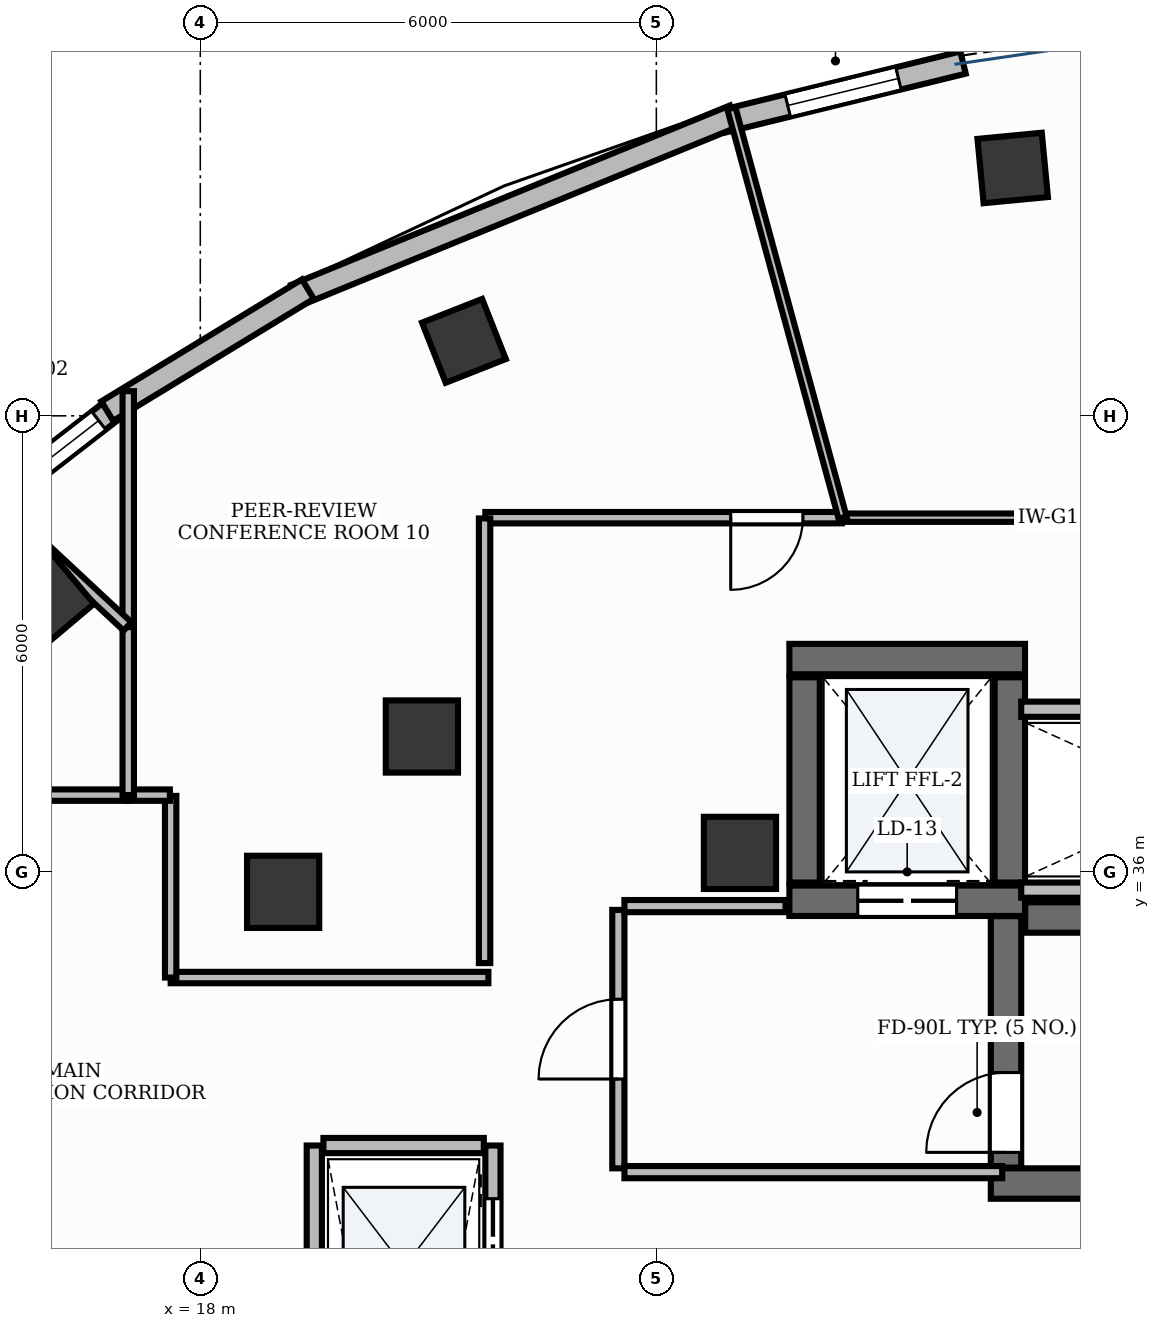
"""IFC4 building model, lengths in metres.
Left out: names, types, materials, properties, quantities, classifications, styles, units other than length and angle.
Written with IfcOpenShell. Run it as: python <this file> out.ifc"""

import sys

from ifc_helpers import new_model, si_unit, direction, frame, frame_2d, origin, origin_2d, place, context, subcontext, project, spatial, rectangle, extrude, element, fill, save


model = new_model("IFC4")
c1 = context("Model", 3, precision=1e-05, world=origin(), true_north=direction((0.0, 1.0)))
c2 = subcontext(c1, "Body", "Model", "MODEL_VIEW")
j1 = project(units=[si_unit("LENGTHUNIT", "METRE"), si_unit("PLANEANGLEUNIT", "RADIAN")], contexts=[c1])
p1 = place(None, origin())
s1 = spatial("IfcSite", under=j1, at=p1, CompositionType="ELEMENT")
p2 = place(p1, origin())
s2 = spatial("IfcBuilding", under=s1, at=p2, CompositionType="ELEMENT")
p3 = place(p2, frame((0.0, 0.0, 260.4)))
s3 = spatial("IfcBuildingStorey", under=s2, at=p3, CompositionType="ELEMENT", Elevation=260.4)
p4 = place(p3, frame((28.852, 35.4, 0.0), z_axis=(0.0, 0.0, 1.0), x_axis=(1.0, 0.0, 0.0)))
e1 = element("IfcWall", 1, at=p4, inside=s3, PredefinedType="SHEAR", context=c2, shape_type="SweptSolid", body=[
    extrude(rectangle(XDim=8.198, YDim=0.4, at=frame_2d((4.099, 0.0))), origin(), (0.0, 0.0, 1.0), 3.9),
])
p5 = place(p3, frame((28.4, 31.9, 0.0), z_axis=(0.0, 0.0, 1.0), x_axis=(1.0, 0.0, 0.0)))
e2 = element("IfcWall", 2, at=p5, inside=s3, PredefinedType="SHEAR", context=c2, shape_type="SweptSolid", body=[
    extrude(rectangle(XDim=8.65, YDim=0.4, at=frame_2d((4.325, 0.0))), origin(), (0.0, 0.0, 1.0), 3.9),
])
p6 = place(p3, frame((28.6, 32.11, 0.0), z_axis=(0.0, 0.0, 1.0), x_axis=(0.0, 1.0, 0.0)))
e3 = element("IfcWall", 3, at=p6, inside=s3, PredefinedType="SHEAR", context=c2, shape_type="SweptSolid", body=[
    extrude(rectangle(XDim=3.308, YDim=0.4, at=frame_2d((1.654, 0.0))), origin(), (0.0, 0.0, 1.0), 3.9),
])
p7 = place(p6, frame((0.2, 0.0, 0.0)))
e4 = element("IfcOpeningElement", 4, at=p7, cuts=e3, PredefinedType="OPENING", context=c2, shape_type="SweptSolid", body=[
    extrude(rectangle(XDim=1.05, YDim=2.15, at=frame_2d((0.525, 1.075))), frame((0.0, 0.215, 0.0), z_axis=(0.0, -1.0, 0.0), x_axis=(1.0, 0.0, 0.0)), (0.0, 0.0, 1.0), 0.43),
])
p8 = place(p3, frame((25.75, 38.8, 0.0), z_axis=(0.0, 0.0, 1.0), x_axis=(1.0, 0.0, 0.0)))
e5 = element("IfcWall", 5, at=p8, inside=s3, PredefinedType="SHEAR", context=c2, shape_type="SweptSolid", body=[
    extrude(rectangle(XDim=3.1, YDim=0.4, at=frame_2d((1.55, 0.0))), origin(), (0.0, 0.0, 1.0), 3.9),
])
p9 = place(p3, frame((25.75, 35.62, 0.0), z_axis=(0.0, 0.0, 1.0), x_axis=(1.0, 0.0, 0.0)))
e6 = element("IfcWall", 6, at=p9, inside=s3, PredefinedType="SHEAR", context=c2, shape_type="SweptSolid", body=[
    extrude(rectangle(XDim=3.1, YDim=0.4, at=frame_2d((1.55, 0.0))), origin(), (0.0, 0.0, 1.0), 3.9),
])
p10 = place(p9, frame((0.9, 0.0, 0.0)))
e7 = element("IfcOpeningElement", 7, at=p10, cuts=e6, PredefinedType="OPENING", context=c2, shape_type="SweptSolid", body=[
    extrude(rectangle(XDim=1.3, YDim=2.2, at=frame_2d((0.65, 1.1))), frame((0.0, 0.215, 0.0), z_axis=(0.0, -1.0, 0.0), x_axis=(1.0, 0.0, 0.0)), (0.0, 0.0, 1.0), 0.43),
])
for number, where, z_axis, x_axis in (
    (8, (25.95, 35.86, 0.0), (0.0, 0.0, 1.0), (0.0, 1.0, 0.0)),
    (9, (28.65, 35.86, 0.0), (0.0, 0.0, 1.0), (0.0, 1.0, 0.0)),
):
    element("IfcWall", number, at=place(p3, frame(where, z_axis=z_axis, x_axis=x_axis)), inside=s3, PredefinedType="SHEAR", context=c2, shape_type="SweptSolid", body=[
        extrude(rectangle(XDim=2.7, YDim=0.4, at=frame_2d((1.35, 0.0))), origin(), (0.0, 0.0, 1.0), 3.9),
    ])
p11 = place(p3, frame((25.1, 36.25, -0.0), z_axis=(0.0, 0.0, 1.0), x_axis=(1.0, 0.0, 0.0)))
e10 = element("IfcColumn", 10, at=p11, inside=s3, PredefinedType="PILASTER", context=c2, shape_type="SweptSolid", body=[
    extrude(rectangle(XDim=0.95, YDim=0.95, at=origin_2d()), origin(), (0.0, 0.0, 1.0), 3.901),
])
for number, where, z_axis, x_axis in (
    (11, (28.688, 45.261, -0.0), (0.0, 0.0, 1.0), (0.995, 0.095, 0.0)),
    (12, (21.469, 42.986, -0.0), (0.0, 0.0, 1.0), (0.93, 0.367, 0.0)),
    (13, (16.003, 39.579, -0.0), (0.0, 0.0, 1.0), (0.764, 0.645, 0.0)),
):
    element("IfcColumn", number, at=place(p3, frame(where, z_axis=z_axis, x_axis=x_axis)), inside=s3, PredefinedType="COLUMN", context=c2, shape_type="SweptSolid", body=[
        extrude(rectangle(XDim=0.85, YDim=0.85, at=origin_2d()), origin(), (0.0, 0.0, 1.0), 3.901),
    ])
for number, where, z_axis, x_axis in (
    (14, (20.915, 37.781, -0.0), (0.0, 0.0, 1.0), (1.0, 0.0, 0.0)),
    (15, (19.09, 35.738, -0.0), (0.0, 0.0, 1.0), (1.0, 0.0, 0.0)),
):
    element("IfcColumn", number, at=place(p3, frame(where, z_axis=z_axis, x_axis=x_axis)), inside=s3, PredefinedType="COLUMN", context=c2, shape_type="SweptSolid", body=[
        extrude(rectangle(XDim=0.95, YDim=0.95, at=origin_2d()), origin(), (0.0, 0.0, 1.0), 3.901),
    ])
p12 = place(p3, frame((28.035, 46.647, 0.0), z_axis=(0.0, 0.0, 1.0), x_axis=(-0.971310768778, -0.237813772636, 0.0)))
e16 = element("IfcWall", 16, at=p12, inside=s3, PredefinedType="STANDARD", context=c2, shape_type="SweptSolid", body=[
    extrude(rectangle(XDim=3.25, YDim=0.3, at=frame_2d((1.625, 0.0))), origin(), (0.0, 0.0, 1.0), 3.9),
])
p13 = place(p12, frame((0.875, 0.0, 0.95)))
e17 = element("IfcOpeningElement", 17, at=p13, cuts=e16, PredefinedType="OPENING", context=c2, shape_type="SweptSolid", body=[
    extrude(rectangle(XDim=1.5, YDim=1.8, at=frame_2d((0.75, 0.9))), frame((0.0, 0.165, 0.0), z_axis=(0.0, -1.0, 0.0), x_axis=(1.0, 0.0, 0.0)), (0.0, 0.0, 1.0), 0.33),
])
p14 = place(p3, frame((16.917, 42.134, 0.0), z_axis=(0.0, 0.0, 1.0), x_axis=(-0.790517782709, -0.612439086948, 0.0)))
e18 = element("IfcWall", 18, at=p14, inside=s3, PredefinedType="STANDARD", context=c2, shape_type="SweptSolid", body=[
    extrude(rectangle(XDim=2.963, YDim=0.3, at=frame_2d((1.481, 0.0))), origin(), (0.0, 0.0, 1.0), 3.9),
])
p15 = place(p14, frame((0.32, 0.0, 0.95)))
e19 = element("IfcOpeningElement", 19, at=p15, cuts=e18, PredefinedType="OPENING", context=c2, shape_type="SweptSolid", body=[
    extrude(rectangle(XDim=1.5, YDim=1.8, at=frame_2d((0.75, 0.9))), frame((0.0, 0.165, 0.0), z_axis=(0.0, -1.0, 0.0), x_axis=(1.0, 0.0, 0.0)), (0.0, 0.0, 1.0), 0.33),
])
p16 = place(p3, frame((25.025, 45.945, 0.0), z_axis=(0.0, 0.0, 1.0), x_axis=(-0.925644837168, -0.378393492841, 0.0)))
e20 = element("IfcWall", 20, at=p16, inside=s3, PredefinedType="STANDARD", context=c2, shape_type="SweptSolid", body=[
    extrude(rectangle(XDim=6.236, YDim=0.3, at=frame_2d((3.118, 0.0))), origin(), (0.0, 0.0, 1.0), 3.9),
])
p17 = place(p3, frame((19.415, 43.667, 0.0), z_axis=(0.0, 0.0, 1.0), x_axis=(-0.854500616392, -0.519450379329, 0.0)))
e21 = element("IfcWall", 21, at=p17, inside=s3, PredefinedType="STANDARD", context=c2, shape_type="SweptSolid", body=[
    extrude(rectangle(XDim=3.089, YDim=0.3, at=frame_2d((1.544, 0.0))), origin(), (0.0, 0.0, 1.0), 3.9),
])
p18 = place(p3, frame((19.5, 21.6, 0.0), z_axis=(0.0, 0.0, 1.0), x_axis=(0.0, 1.0, 0.0)))
e22 = element("IfcWall", 22, at=p18, inside=s3, PredefinedType="PARTITIONING", context=c2, shape_type="SweptSolid", body=[
    extrude(rectangle(XDim=10.8, YDim=0.2, at=frame_2d((5.4, 0.0))), origin(), (0.0, 0.0, 1.0), 2.91),
])
p19 = place(p3, frame((21.85, 21.6, 0.0), z_axis=(0.0, 0.0, 1.0), x_axis=(0.0, 1.0, 0.0)))
e23 = element("IfcWall", 23, at=p19, inside=s3, PredefinedType="PARTITIONING", context=c2, shape_type="SweptSolid", body=[
    extrude(rectangle(XDim=10.8, YDim=0.2, at=frame_2d((5.4, 0.0))), origin(), (0.0, 0.0, 1.0), 2.91),
])
p20 = place(p19, frame((0.9, 0.0, 0.0)))
e24 = element("IfcOpeningElement", 24, at=p20, cuts=e23, PredefinedType="OPENING", context=c2, shape_type="SweptSolid", body=[
    extrude(rectangle(XDim=1.1, YDim=2.2, at=frame_2d((0.55, 1.1))), frame((0.0, 0.115, 0.0), z_axis=(0.0, -1.0, 0.0), x_axis=(1.0, 0.0, 0.0)), (0.0, 0.0, 1.0), 0.23),
])
p21 = place(p19, frame((3.6, 0.0, 0.0)))
e25 = element("IfcOpeningElement", 25, at=p21, cuts=e23, PredefinedType="OPENING", context=c2, shape_type="SweptSolid", body=[
    extrude(rectangle(XDim=1.1, YDim=2.2, at=frame_2d((0.55, 1.1))), frame((0.0, 0.115, 0.0), z_axis=(0.0, -1.0, 0.0), x_axis=(1.0, 0.0, 0.0)), (0.0, 0.0, 1.0), 0.23),
])
p22 = place(p19, frame((6.3, 0.0, 0.0)))
e26 = element("IfcOpeningElement", 26, at=p22, cuts=e23, PredefinedType="OPENING", context=c2, shape_type="SweptSolid", body=[
    extrude(rectangle(XDim=1.1, YDim=2.2, at=frame_2d((0.55, 1.1))), frame((0.0, 0.115, 0.0), z_axis=(0.0, -1.0, 0.0), x_axis=(1.0, 0.0, 0.0)), (0.0, 0.0, 1.0), 0.23),
])
p23 = place(p19, frame((9.0, 0.0, 0.0)))
e27 = element("IfcOpeningElement", 27, at=p23, cuts=e23, PredefinedType="OPENING", context=c2, shape_type="SweptSolid", body=[
    extrude(rectangle(XDim=1.1, YDim=2.2, at=frame_2d((0.55, 1.1))), frame((0.0, 0.115, 0.0), z_axis=(0.0, -1.0, 0.0), x_axis=(1.0, 0.0, 0.0)), (0.0, 0.0, 1.0), 0.23),
])
p24 = place(p3, frame((19.62, 32.4, 0.0), z_axis=(0.0, 0.0, 1.0), x_axis=(1.0, 0.0, 0.0)))
e28 = element("IfcWall", 28, at=p24, inside=s3, PredefinedType="PARTITIONING", context=c2, shape_type="SweptSolid", body=[
    extrude(rectangle(XDim=2.11, YDim=0.2, at=frame_2d((1.055, 0.0))), origin(), (0.0, 0.0, 1.0), 2.91),
])
for number, where, z_axis, x_axis in (
    (29, (28.8, 35.76, 0.0), (0.0, 0.0, 1.0), (1.0, 0.0, 0.0)),
    (30, (28.8, 38.14, 0.0), (0.0, 0.0, 1.0), (1.0, 0.0, 0.0)),
):
    element("IfcWall", number, at=place(p3, frame(where, z_axis=z_axis, x_axis=x_axis)), inside=s3, PredefinedType="PARTITIONING", context=c2, shape_type="SweptSolid", body=[
        extrude(rectangle(XDim=4.57, YDim=0.2, at=frame_2d((2.285, 0.0))), origin(), (0.0, 0.0, 1.0), 2.91),
    ])
p25 = place(p3, frame((23.5, 32.1, 0.0), z_axis=(0.0, 0.0, 1.0), x_axis=(0.0, 1.0, 0.0)))
e31 = element("IfcWall", 31, at=p25, inside=s3, PredefinedType="PARTITIONING", context=c2, shape_type="SweptSolid", body=[
    extrude(rectangle(XDim=3.4, YDim=0.16, at=frame_2d((1.7, 0.0))), origin(), (0.0, 0.0, 1.0), 2.91),
])
p26 = place(p25, frame((1.175, 0.0, 0.0)))
e32 = element("IfcOpeningElement", 32, at=p26, cuts=e31, PredefinedType="OPENING", context=c2, shape_type="SweptSolid", body=[
    extrude(rectangle(XDim=1.05, YDim=2.15, at=frame_2d((0.525, 1.075))), frame((0.0, 0.095, 0.0), z_axis=(0.0, -1.0, 0.0), x_axis=(1.0, 0.0, 0.0)), (0.0, 0.0, 1.0), 0.19),
])
p27 = place(p3, frame((23.58, 32.05, 0.0), z_axis=(0.0, 0.0, 1.0), x_axis=(1.0, 0.0, 0.0)))
e33 = element("IfcWall", 33, at=p27, inside=s3, PredefinedType="PARTITIONING", context=c2, shape_type="SweptSolid", body=[
    extrude(rectangle(XDim=4.97, YDim=0.16, at=frame_2d((2.485, 0.0))), origin(), (0.0, 0.0, 1.0), 2.91),
])
p28 = place(p3, frame((23.58, 35.55, 0.0), z_axis=(0.0, 0.0, 1.0), x_axis=(1.0, 0.0, 0.0)))
e34 = element("IfcWall", 34, at=p28, inside=s3, PredefinedType="PARTITIONING", context=c2, shape_type="SweptSolid", body=[
    extrude(rectangle(XDim=2.12, YDim=0.16, at=frame_2d((1.06, 0.0))), origin(), (0.0, 0.0, 1.0), 2.91),
])
p29 = place(p3, frame((37.2, 40.66, 0.0), z_axis=(0.0, 0.0, 1.0), x_axis=(-1.0, 0.0, 0.0)))
e35 = element("IfcWall", 35, at=p29, inside=s3, PredefinedType="MOVABLE", context=c2, shape_type="SweptSolid", body=[
    extrude(rectangle(XDim=10.75, YDim=0.11, at=frame_2d((5.375, 0.0))), origin(), (0.0, 0.0, 1.0), 2.91),
])
p30 = place(p29, frame((2.023, 0.0, 0.0)))
e36 = element("IfcOpeningElement", 36, at=p30, cuts=e35, PredefinedType="OPENING", context=c2, shape_type="SweptSolid", body=[
    extrude(rectangle(XDim=0.95, YDim=2.15, at=frame_2d((0.475, 1.075))), frame((0.0, 0.07, 0.0), z_axis=(0.0, -1.0, 0.0), x_axis=(1.0, 0.0, 0.0)), (0.0, 0.0, 1.0), 0.14),
])
p31 = place(p3, frame((26.44, 40.66, 0.0), z_axis=(0.0, 0.0, 1.0), x_axis=(-1.0, 0.0, 0.0)))
e37 = element("IfcWall", 37, at=p31, inside=s3, PredefinedType="PARTITIONING", context=c2, shape_type="SweptSolid", body=[
    extrude(rectangle(XDim=4.69, YDim=0.15, at=frame_2d((2.345, 0.0))), origin(), (0.0, 0.0, 1.0), 2.91),
])
p32 = place(p31, frame((0.512, 0.0, 0.0)))
e38 = element("IfcOpeningElement", 38, at=p32, cuts=e37, PredefinedType="OPENING", context=c2, shape_type="SweptSolid", body=[
    extrude(rectangle(XDim=0.95, YDim=2.15, at=frame_2d((0.475, 1.075))), frame((0.0, 0.09, 0.0), z_axis=(0.0, -1.0, 0.0), x_axis=(1.0, 0.0, 0.0)), (0.0, 0.0, 1.0), 0.18),
])
p33 = place(p3, frame((17.042, 37.01, 0.0), z_axis=(0.0, 0.0, 1.0), x_axis=(-1.0, 0.0, 0.0)))
e39 = element("IfcWall", 39, at=p33, inside=s3, PredefinedType="PARTITIONING", context=c2, shape_type="SweptSolid", body=[
    extrude(rectangle(XDim=2.589, YDim=0.15, at=frame_2d((1.295, 0.0))), origin(), (0.0, 0.0, 1.0), 2.91),
])
p34 = place(p33, frame((1.399, 0.0, 0.0)))
e40 = element("IfcOpeningElement", 40, at=p34, cuts=e39, PredefinedType="OPENING", context=c2, shape_type="SweptSolid", body=[
    extrude(rectangle(XDim=0.95, YDim=2.15, at=frame_2d((0.475, 1.075))), frame((0.0, 0.09, 0.0), z_axis=(0.0, -1.0, 0.0), x_axis=(1.0, 0.0, 0.0)), (0.0, 0.0, 1.0), 0.18),
])
p35 = place(p3, frame((26.45, 40.66, 0.0), z_axis=(0.0, 0.0, 1.0), x_axis=(-0.262158446876, 0.965024843583, 0.0)))
e41 = element("IfcWall", 41, at=p35, inside=s3, PredefinedType="MOVABLE", context=c2, shape_type="SweptSolid", body=[
    extrude(rectangle(XDim=5.58, YDim=0.11, at=frame_2d((2.79, 0.0))), origin(), (0.0, 0.0, 1.0), 2.91),
])
p36 = place(p3, frame((17.052, 39.226, 0.0), z_axis=(0.0, 0.0, 1.0), x_axis=(0.0, 1.0, 0.0)))
e42 = element("IfcWall", 42, at=p36, inside=s3, PredefinedType="PARTITIONING", context=c2, shape_type="SweptSolid", body=[
    extrude(rectangle(XDim=3.099, YDim=0.15, at=frame_2d((1.549, 0.0))), origin(), (0.0, 0.0, 1.0), 2.91),
])
p37 = place(p3, frame((21.74, 40.65, 0.0), z_axis=(0.0, 0.0, 1.0), x_axis=(0.0, -1.0, 0.0)))
e43 = element("IfcWall", 43, at=p37, inside=s3, PredefinedType="PARTITIONING", context=c2, shape_type="SweptSolid", body=[
    extrude(rectangle(XDim=5.85, YDim=0.15, at=frame_2d((2.925, 0.0))), origin(), (0.0, 0.0, 1.0), 2.91),
])
p38 = place(p3, frame((21.79, 34.61, 0.0), z_axis=(0.0, 0.0, 1.0), x_axis=(-1.0, 0.0, 0.0)))
e44 = element("IfcWall", 44, at=p38, inside=s3, PredefinedType="PARTITIONING", context=c2, shape_type="SweptSolid", body=[
    extrude(rectangle(XDim=4.18, YDim=0.15, at=frame_2d((2.09, 0.0))), origin(), (0.0, 0.0, 1.0), 2.91),
])
p39 = place(p3, frame((17.61, 34.61, 0.0), z_axis=(0.0, 0.0, 1.0), x_axis=(0.0, 1.0, 0.0)))
e45 = element("IfcWall", 45, at=p39, inside=s3, PredefinedType="PARTITIONING", context=c2, shape_type="SweptSolid", body=[
    extrude(rectangle(XDim=2.39, YDim=0.15, at=frame_2d((1.195, 0.0))), origin(), (0.0, 0.0, 1.0), 2.91),
])
p40 = place(p3, frame((17.6, 37.01, 0.0), z_axis=(0.0, 0.0, 1.0), x_axis=(-1.0, 0.0, 0.0)))
e46 = element("IfcWall", 46, at=p40, inside=s3, PredefinedType="PARTITIONING", context=c2, shape_type="SweptSolid", body=[
    extrude(rectangle(XDim=0.548, YDim=0.15, at=frame_2d((0.274, 0.0))), origin(), (0.0, 0.0, 1.0), 2.91),
])
p41 = place(p3, frame((17.052, 37.01, 0.0), z_axis=(0.0, 0.0, 1.0), x_axis=(0.0, 1.0, 0.0)))
e47 = element("IfcWall", 47, at=p41, inside=s3, PredefinedType="PARTITIONING", context=c2, shape_type="SweptSolid", body=[
    extrude(rectangle(XDim=2.21, YDim=0.15, at=frame_2d((1.105, 0.0))), origin(), (0.0, 0.0, 1.0), 2.91),
])
p42 = place(p3, frame((15.183, 40.963, 0.0), z_axis=(0.0, 0.0, 1.0), x_axis=(0.731313930883, -0.682041006462, 0.0)))
e48 = element("IfcWall", 48, at=p42, inside=s3, PredefinedType="PARTITIONING", context=c2, shape_type="SweptSolid", body=[
    extrude(rectangle(XDim=2.542, YDim=0.15, at=frame_2d((1.271, 0.0))), origin(), (0.0, 0.0, 1.0), 2.91),
])
p43 = place(p13, origin())
e49 = element("IfcWindow", 49, at=p43, inside=s3, PartitioningType="DOUBLE_PANEL_VERTICAL", PredefinedType="WINDOW", context=c2, shape_type="SweptSolid", body=[
    extrude(rectangle(XDim=1.5, YDim=1.8, at=frame_2d((0.75, 0.9))), frame((0.0, 0.03, 0.0), z_axis=(0.0, -1.0, 0.0), x_axis=(1.0, 0.0, 0.0)), (0.0, 0.0, 1.0), 0.06),
])
fill(e17, e49)
p44 = place(p15, origin())
e50 = element("IfcWindow", 50, at=p44, inside=s3, PartitioningType="DOUBLE_PANEL_VERTICAL", PredefinedType="WINDOW", context=c2, shape_type="SweptSolid", body=[
    extrude(rectangle(XDim=1.5, YDim=1.8, at=frame_2d((0.75, 0.9))), frame((0.0, 0.03, 0.0), z_axis=(0.0, -1.0, 0.0), x_axis=(1.0, 0.0, 0.0)), (0.0, 0.0, 1.0), 0.06),
])
fill(e19, e50)
p45 = place(p7, origin())
e51 = element("IfcDoor", 51, at=p45, inside=s3, OperationType="SINGLE_SWING_LEFT", PredefinedType="DOOR", context=c2, shape_type="SweptSolid", body=[
    extrude(rectangle(XDim=1.05, YDim=2.15, at=frame_2d((0.525, 1.075))), frame((0.0, 0.025, 0.0), z_axis=(0.0, -1.0, 0.0), x_axis=(1.0, 0.0, 0.0)), (0.0, 0.0, 1.0), 0.05),
])
fill(e4, e51)
p46 = place(p23, origin())
e52 = element("IfcDoor", 52, at=p46, inside=s3, OperationType="DOUBLE_DOOR_SLIDING", PredefinedType="DOOR", context=c2, shape_type="SweptSolid", body=[
    extrude(rectangle(XDim=1.1, YDim=2.2, at=frame_2d((0.55, 1.1))), frame((0.0, 0.025, 0.0), z_axis=(0.0, -1.0, 0.0), x_axis=(1.0, 0.0, 0.0)), (0.0, 0.0, 1.0), 0.05),
])
fill(e27, e52)
p47 = place(p10, origin())
e53 = element("IfcDoor", 53, at=p47, inside=s3, OperationType="DOUBLE_DOOR_SLIDING", PredefinedType="DOOR", context=c2, shape_type="SweptSolid", body=[
    extrude(rectangle(XDim=1.3, YDim=2.2, at=frame_2d((0.65, 1.1))), frame((0.0, 0.025, 0.0), z_axis=(0.0, -1.0, 0.0), x_axis=(1.0, 0.0, 0.0)), (0.0, 0.0, 1.0), 0.05),
])
fill(e7, e53)
p48 = place(p26, origin())
e54 = element("IfcDoor", 54, at=p48, inside=s3, OperationType="SINGLE_SWING_LEFT", PredefinedType="DOOR", context=c2, shape_type="SweptSolid", body=[
    extrude(rectangle(XDim=1.05, YDim=2.15, at=frame_2d((0.525, 1.075))), frame((0.0, 0.025, 0.0), z_axis=(0.0, -1.0, 0.0), x_axis=(1.0, 0.0, 0.0)), (0.0, 0.0, 1.0), 0.05),
])
fill(e32, e54)
p49 = place(p32, origin())
e55 = element("IfcDoor", 55, at=p49, inside=s3, OperationType="SINGLE_SWING_RIGHT", PredefinedType="DOOR", context=c2, shape_type="SweptSolid", body=[
    extrude(rectangle(XDim=0.95, YDim=2.15, at=frame_2d((0.475, 1.075))), frame((0.0, 0.025, 0.0), z_axis=(0.0, -1.0, 0.0), x_axis=(1.0, 0.0, 0.0)), (0.0, 0.0, 1.0), 0.05),
])
fill(e38, e55)
save(model, sys.argv[1])
